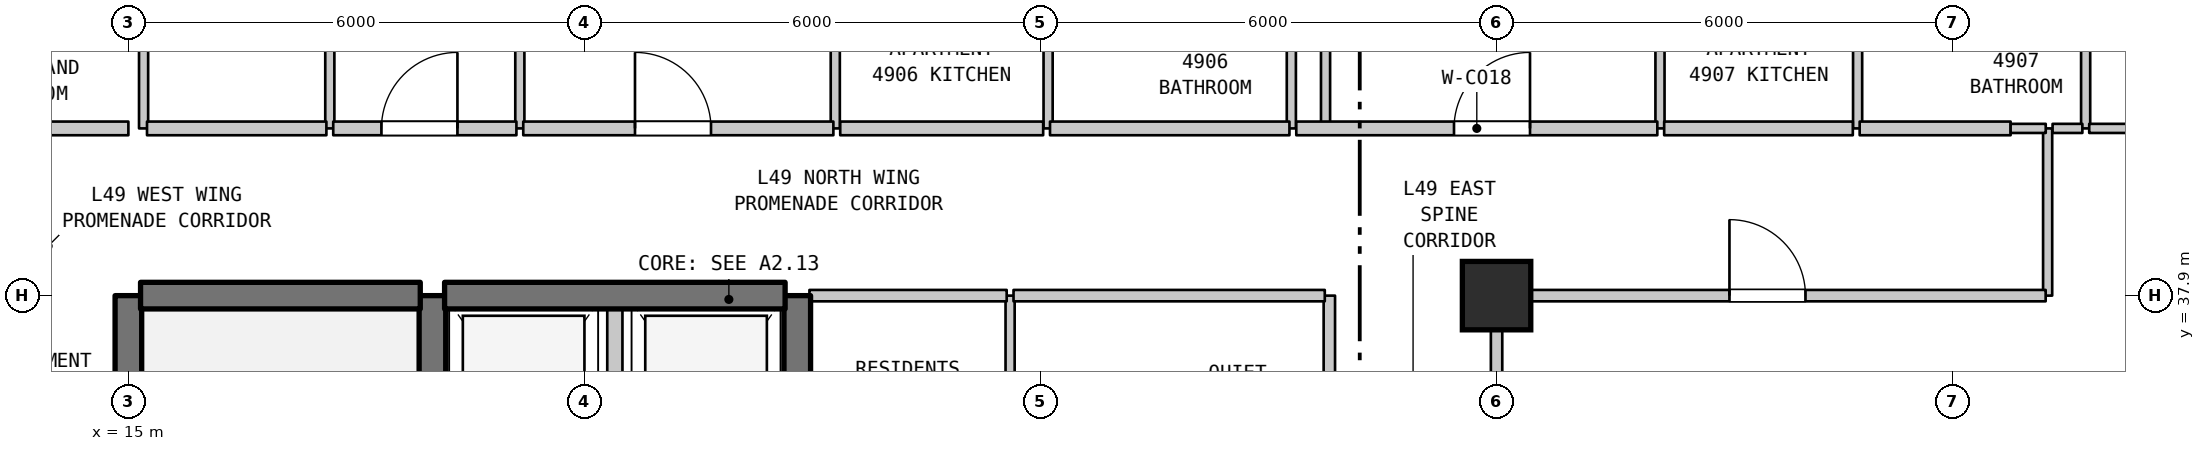
"""IFC4 building model, lengths in metres.
Left out: names, types, materials, properties, quantities, classifications, styles, units other than length and angle.
Written with IfcOpenShell. Run it as: python <this file> out.ifc"""

import sys

from ifc_helpers import new_model, si_unit, direction, frame, frame_2d, origin, origin_2d, place, context, subcontext, project, spatial, rectangle, extrude, element, fill, save


model = new_model("IFC4")
c1 = context("Model", 3, precision=1e-05, world=origin(), true_north=direction((0.0, 1.0)))
c2 = subcontext(c1, "Body", "Model", "MODEL_VIEW")
j1 = project(units=[si_unit("LENGTHUNIT", "METRE"), si_unit("PLANEANGLEUNIT", "RADIAN")], contexts=[c1])
p1 = place(None, origin())
s1 = spatial("IfcSite", under=j1, at=p1, CompositionType="ELEMENT")
p2 = place(p1, origin())
s2 = spatial("IfcBuilding", under=s1, at=p2, CompositionType="ELEMENT")
p3 = place(p2, frame((0.0, 0.0, 199.5)))
s3 = spatial("IfcBuildingStorey", under=s2, at=p3, CompositionType="ELEMENT", Elevation=199.5)
p4 = place(p3, frame((33.0, 37.9, 0.0), z_axis=(0.0, 0.0, 1.0), x_axis=(1.0, 0.0, 0.0)))
e1 = element("IfcColumn", 1, at=p4, inside=s3, PredefinedType="COLUMN", context=c2, shape_type="SweptSolid", body=[
    extrude(rectangle(XDim=0.9, YDim=0.9, at=origin_2d()), origin(), (0.0, 0.0, 1.0), 3.7),
])
p5 = place(p3, frame((15.0, 31.1, 0.0), z_axis=(0.0, 0.0, 1.0), x_axis=(0.0, 1.0, 0.0)))
e2 = element("IfcWall", 2, at=p5, inside=s3, PredefinedType="SHEAR", context=c2, shape_type="SweptSolid", body=[
    extrude(rectangle(XDim=6.8, YDim=0.35, at=frame_2d((3.4, 0.0))), origin(), (0.0, 0.0, 1.0), 3.39),
])
p6 = place(p3, frame((15.2, 40.1, 0.0), z_axis=(0.0, 0.0, 1.0), x_axis=(0.0, 1.0, 0.0)))
e3 = element("IfcWall", 3, at=p6, inside=s3, PredefinedType="PARTITIONING", context=c2, shape_type="SweptSolid", body=[
    extrude(rectangle(XDim=3.2, YDim=0.12, at=frame_2d((1.6, 0.0))), origin(), (0.0, 0.0, 1.0), 3.39),
])
p7 = place(p3, frame((17.65, 40.1, 0.0), z_axis=(0.0, 0.0, 1.0), x_axis=(0.0, 1.0, 0.0)))
e4 = element("IfcWall", 4, at=p7, inside=s3, PredefinedType="PARTITIONING", context=c2, shape_type="SweptSolid", body=[
    extrude(rectangle(XDim=3.2, YDim=0.12, at=frame_2d((1.6, 0.0))), origin(), (0.0, 0.0, 1.0), 3.39),
])
p8 = place(p7, frame((1.15, 0.0, 0.0)))
e5 = element("IfcOpeningElement", 5, at=p8, cuts=e4, PredefinedType="OPENING", context=c2, shape_type="SweptSolid", body=[
    extrude(rectangle(XDim=0.9, YDim=2.15, at=frame_2d((0.45, 1.075))), frame((0.0, 0.07, 0.0), z_axis=(0.0, -1.0, 0.0), x_axis=(1.0, 0.0, 0.0)), (0.0, 0.0, 1.0), 0.14),
])
p9 = place(p3, frame((19.0, 35.0, 0.0), z_axis=(0.0, 0.0, 1.0), x_axis=(0.0, 1.0, 0.0)))
e6 = element("IfcWall", 6, at=p9, inside=s3, PredefinedType="SHEAR", context=c2, shape_type="SweptSolid", body=[
    extrude(rectangle(XDim=2.9, YDim=0.35, at=frame_2d((1.45, 0.0))), origin(), (0.0, 0.0, 1.0), 3.39),
])
p10 = place(p3, frame((20.15, 40.1, 0.0), z_axis=(0.0, 0.0, 1.0), x_axis=(0.0, 1.0, 0.0)))
e7 = element("IfcWall", 7, at=p10, inside=s3, PredefinedType="PARTITIONING", context=c2, shape_type="SweptSolid", body=[
    extrude(rectangle(XDim=13.79, YDim=0.12, at=frame_2d((6.895, 0.0))), origin(), (0.0, 0.0, 1.0), 3.39),
])
p11 = place(p3, frame((21.4, 35.0, 0.0), z_axis=(0.0, 0.0, 1.0), x_axis=(0.0, 1.0, 0.0)))
e8 = element("IfcWall", 8, at=p11, inside=s3, PredefinedType="STANDARD", context=c2, shape_type="SweptSolid", body=[
    extrude(rectangle(XDim=2.9, YDim=0.2, at=frame_2d((1.45, 0.0))), origin(), (0.0, 0.0, 1.0), 3.39),
])
p12 = place(p3, frame((23.8, 35.0, 0.0), z_axis=(0.0, 0.0, 1.0), x_axis=(0.0, 1.0, 0.0)))
e9 = element("IfcWall", 9, at=p12, inside=s3, PredefinedType="SHEAR", context=c2, shape_type="SweptSolid", body=[
    extrude(rectangle(XDim=2.9, YDim=0.35, at=frame_2d((1.45, 0.0))), origin(), (0.0, 0.0, 1.0), 3.39),
])
p13 = place(p3, frame((24.3, 40.1, 0.0), z_axis=(0.0, 0.0, 1.0), x_axis=(0.0, 1.0, 0.0)))
e10 = element("IfcWall", 10, at=p13, inside=s3, PredefinedType="PARTITIONING", context=c2, shape_type="SweptSolid", body=[
    extrude(rectangle(XDim=2.3, YDim=0.12, at=frame_2d((1.15, 0.0))), origin(), (0.0, 0.0, 1.0), 3.39),
])
p14 = place(p3, frame((26.6, 35.0, 0.0), z_axis=(0.0, 0.0, 1.0), x_axis=(0.0, 1.0, 0.0)))
e11 = element("IfcWall", 11, at=p14, inside=s3, PredefinedType="PARTITIONING", context=c2, shape_type="SweptSolid", body=[
    extrude(rectangle(XDim=2.9, YDim=0.12, at=frame_2d((1.45, 0.0))), origin(), (0.0, 0.0, 1.0), 3.39),
])
for number, where, z_axis, x_axis in (
    (12, (27.1, 40.1, 0.0), (0.0, 0.0, 1.0), (0.0, 1.0, 0.0)),
    (13, (30.3, 40.1, 0.0), (0.0, 0.0, 1.0), (0.0, 1.0, 0.0)),
):
    element("IfcWall", number, at=place(p3, frame(where, z_axis=z_axis, x_axis=x_axis)), inside=s3, PredefinedType="PARTITIONING", context=c2, shape_type="SweptSolid", body=[
        extrude(rectangle(XDim=2.3, YDim=0.12, at=frame_2d((1.15, 0.0))), origin(), (0.0, 0.0, 1.0), 3.39),
    ])
p15 = place(p3, frame((30.75, 40.1, 0.0), z_axis=(0.0, 0.0, 1.0), x_axis=(0.0, 1.0, 0.0)))
e14 = element("IfcWall", 14, at=p15, inside=s3, PredefinedType="PARTITIONING", context=c2, shape_type="SweptSolid", body=[
    extrude(rectangle(XDim=13.79, YDim=0.12, at=frame_2d((6.895, 0.0))), origin(), (0.0, 0.0, 1.0), 3.39),
])
p16 = place(p3, frame((30.8, 35.0, 0.0), z_axis=(0.0, 0.0, 1.0), x_axis=(0.0, 1.0, 0.0)))
e15 = element("IfcWall", 15, at=p16, inside=s3, PredefinedType="STANDARD", context=c2, shape_type="SweptSolid", body=[
    extrude(rectangle(XDim=2.9, YDim=0.15, at=frame_2d((1.45, 0.0))), origin(), (0.0, 0.0, 1.0), 3.39),
])
p17 = place(p3, frame((33.0, 34.22, 0.0), z_axis=(0.0, 0.0, 1.0), x_axis=(0.0, 1.0, 0.0)))
e16 = element("IfcWall", 16, at=p17, inside=s3, PredefinedType="STANDARD", context=c2, shape_type="SweptSolid", body=[
    extrude(rectangle(XDim=3.68, YDim=0.15, at=frame_2d((1.84, 0.0))), origin(), (0.0, 0.0, 1.0), 2.89),
])
p18 = place(p17, frame((1.268, 0.0, 0.0)))
e17 = element("IfcOpeningElement", 17, at=p18, cuts=e16, PredefinedType="OPENING", context=c2, shape_type="SweptSolid", body=[
    extrude(rectangle(XDim=1.0, YDim=2.15, at=frame_2d((0.5, 1.075))), frame((0.0, 0.085, 0.0), z_axis=(0.0, -1.0, 0.0), x_axis=(1.0, 0.0, 0.0)), (0.0, 0.0, 1.0), 0.17),
])
for number, where, z_axis, x_axis in (
    (18, (35.15, 40.1, 0.0), (0.0, 0.0, 1.0), (0.0, 1.0, 0.0)),
    (19, (37.75, 40.1, 0.0), (0.0, 0.0, 1.0), (0.0, 1.0, 0.0)),
):
    element("IfcWall", number, at=place(p3, frame(where, z_axis=z_axis, x_axis=x_axis)), inside=s3, PredefinedType="PARTITIONING", context=c2, shape_type="SweptSolid", body=[
        extrude(rectangle(XDim=2.3, YDim=0.12, at=frame_2d((1.15, 0.0))), origin(), (0.0, 0.0, 1.0), 3.39),
    ])
p19 = place(p3, frame((40.25, 37.9, 0.0), z_axis=(0.0, 0.0, 1.0), x_axis=(0.0, 1.0, 0.0)))
e20 = element("IfcWall", 20, at=p19, inside=s3, PredefinedType="PARTITIONING", context=c2, shape_type="SweptSolid", body=[
    extrude(rectangle(XDim=2.2, YDim=0.12, at=frame_2d((1.1, 0.0))), origin(), (0.0, 0.0, 1.0), 3.39),
])
p20 = place(p3, frame((40.75, 40.1, 0.0), z_axis=(0.0, 0.0, 1.0), x_axis=(0.0, 1.0, 0.0)))
e21 = element("IfcWall", 21, at=p20, inside=s3, PredefinedType="PARTITIONING", context=c2, shape_type="SweptSolid", body=[
    extrude(rectangle(XDim=2.3, YDim=0.12, at=frame_2d((1.15, 0.0))), origin(), (0.0, 0.0, 1.0), 3.39),
])
p21 = place(p3, frame((15.16, 37.9, 0.0), z_axis=(0.0, 0.0, 1.0), x_axis=(1.0, 0.0, 0.0)))
e22 = element("IfcWall", 22, at=p21, inside=s3, PredefinedType="SHEAR", context=c2, shape_type="SweptSolid", body=[
    extrude(rectangle(XDim=3.68, YDim=0.35, at=frame_2d((1.84, 0.0))), origin(), (0.0, 0.0, 1.0), 3.39),
])
p22 = place(p3, frame((19.16, 37.9, 0.0), z_axis=(0.0, 0.0, 1.0), x_axis=(1.0, 0.0, 0.0)))
e23 = element("IfcWall", 23, at=p22, inside=s3, PredefinedType="SHEAR", context=c2, shape_type="SweptSolid", body=[
    extrude(rectangle(XDim=4.48, YDim=0.35, at=frame_2d((2.24, 0.0))), origin(), (0.0, 0.0, 1.0), 3.39),
])
p23 = place(p3, frame((23.96, 37.9, 0.0), z_axis=(0.0, 0.0, 1.0), x_axis=(1.0, 0.0, 0.0)))
e24 = element("IfcWall", 24, at=p23, inside=s3, PredefinedType="STANDARD", context=c2, shape_type="SweptSolid", body=[
    extrude(rectangle(XDim=2.595, YDim=0.15, at=frame_2d((1.297, 0.0))), origin(), (0.0, 0.0, 1.0), 2.89),
])
p24 = place(p3, frame((26.645, 37.9, 0.0), z_axis=(0.0, 0.0, 1.0), x_axis=(1.0, 0.0, 0.0)))
e25 = element("IfcWall", 25, at=p24, inside=s3, PredefinedType="STANDARD", context=c2, shape_type="SweptSolid", body=[
    extrude(rectangle(XDim=4.095, YDim=0.15, at=frame_2d((2.047, 0.0))), origin(), (0.0, 0.0, 1.0), 2.89),
])
p25 = place(p3, frame((33.06, 37.9, 0.0), z_axis=(0.0, 0.0, 1.0), x_axis=(1.0, 0.0, 0.0)))
e26 = element("IfcWall", 26, at=p25, inside=s3, PredefinedType="STANDARD", context=c2, shape_type="SweptSolid", body=[
    extrude(rectangle(XDim=7.164, YDim=0.15, at=frame_2d((3.582, 0.0))), origin(), (0.0, 0.0, 1.0), 3.39),
])
p26 = place(p25, frame((3.004, 0.0, 0.0)))
e27 = element("IfcOpeningElement", 27, at=p26, cuts=e26, PredefinedType="OPENING", context=c2, shape_type="SweptSolid", body=[
    extrude(rectangle(XDim=1.0, YDim=2.15, at=frame_2d((0.5, 1.075))), frame((0.0, 0.085, 0.0), z_axis=(0.0, -1.0, 0.0), x_axis=(1.0, 0.0, 0.0)), (0.0, 0.0, 1.0), 0.17),
])
p27 = place(p3, frame((12.875, 40.1, 0.0), z_axis=(0.0, 0.0, 1.0), x_axis=(1.0, 0.0, 0.0)))
e28 = element("IfcWall", 28, at=p27, inside=s3, PredefinedType="STANDARD", context=c2, shape_type="SweptSolid", body=[
    extrude(rectangle(XDim=2.125, YDim=0.18, at=frame_2d((1.062, 0.0))), origin(), (0.0, 0.0, 1.0), 3.39),
])
p28 = place(p3, frame((15.245, 40.1, 0.0), z_axis=(0.0, 0.0, 1.0), x_axis=(1.0, 0.0, 0.0)))
e29 = element("IfcWall", 29, at=p28, inside=s3, PredefinedType="STANDARD", context=c2, shape_type="SweptSolid", body=[
    extrude(rectangle(XDim=2.36, YDim=0.18, at=frame_2d((1.18, 0.0))), origin(), (0.0, 0.0, 1.0), 3.39),
])
p29 = place(p3, frame((17.695, 40.1, 0.0), z_axis=(0.0, 0.0, 1.0), x_axis=(1.0, 0.0, 0.0)))
e30 = element("IfcWall", 30, at=p29, inside=s3, PredefinedType="STANDARD", context=c2, shape_type="SweptSolid", body=[
    extrude(rectangle(XDim=2.41, YDim=0.18, at=frame_2d((1.205, 0.0))), origin(), (0.0, 0.0, 1.0), 3.39),
])
p30 = place(p29, frame((0.634, 0.0, 0.0)))
e31 = element("IfcOpeningElement", 31, at=p30, cuts=e30, PredefinedType="OPENING", context=c2, shape_type="SweptSolid", body=[
    extrude(rectangle(XDim=1.0, YDim=2.15, at=frame_2d((0.5, 1.075))), frame((0.0, 0.1, 0.0), z_axis=(0.0, -1.0, 0.0), x_axis=(1.0, 0.0, 0.0)), (0.0, 0.0, 1.0), 0.2),
])
p31 = place(p3, frame((20.195, 40.1, 0.0), z_axis=(0.0, 0.0, 1.0), x_axis=(1.0, 0.0, 0.0)))
e32 = element("IfcWall", 32, at=p31, inside=s3, PredefinedType="STANDARD", context=c2, shape_type="SweptSolid", body=[
    extrude(rectangle(XDim=4.08, YDim=0.18, at=frame_2d((2.04, 0.0))), origin(), (0.0, 0.0, 1.0), 3.39),
])
p32 = place(p31, frame((1.47, 0.0, 0.0)))
e33 = element("IfcOpeningElement", 33, at=p32, cuts=e32, PredefinedType="OPENING", context=c2, shape_type="SweptSolid", body=[
    extrude(rectangle(XDim=1.0, YDim=2.15, at=frame_2d((0.5, 1.075))), frame((0.0, 0.1, 0.0), z_axis=(0.0, -1.0, 0.0), x_axis=(1.0, 0.0, 0.0)), (0.0, 0.0, 1.0), 0.2),
])
p33 = place(p3, frame((24.365, 40.1, 0.0), z_axis=(0.0, 0.0, 1.0), x_axis=(1.0, 0.0, 0.0)))
e34 = element("IfcWall", 34, at=p33, inside=s3, PredefinedType="STANDARD", context=c2, shape_type="SweptSolid", body=[
    extrude(rectangle(XDim=2.67, YDim=0.18, at=frame_2d((1.335, 0.0))), origin(), (0.0, 0.0, 1.0), 3.39),
])
p34 = place(p3, frame((27.125, 40.1, 0.0), z_axis=(0.0, 0.0, 1.0), x_axis=(1.0, 0.0, 0.0)))
e35 = element("IfcWall", 35, at=p34, inside=s3, PredefinedType="STANDARD", context=c2, shape_type="SweptSolid", body=[
    extrude(rectangle(XDim=3.15, YDim=0.18, at=frame_2d((1.575, 0.0))), origin(), (0.0, 0.0, 1.0), 3.39),
])
p35 = place(p3, frame((30.365, 40.1, 0.0), z_axis=(0.0, 0.0, 1.0), x_axis=(1.0, 0.0, 0.0)))
e36 = element("IfcWall", 36, at=p35, inside=s3, PredefinedType="STANDARD", context=c2, shape_type="SweptSolid", body=[
    extrude(rectangle(XDim=4.75, YDim=0.18, at=frame_2d((2.375, 0.0))), origin(), (0.0, 0.0, 1.0), 3.39),
])
p36 = place(p35, frame((2.075, 0.0, 0.0)))
e37 = element("IfcOpeningElement", 37, at=p36, cuts=e36, PredefinedType="OPENING", context=c2, shape_type="SweptSolid", body=[
    extrude(rectangle(XDim=1.0, YDim=2.15, at=frame_2d((0.5, 1.075))), frame((0.0, 0.1, 0.0), z_axis=(0.0, -1.0, 0.0), x_axis=(1.0, 0.0, 0.0)), (0.0, 0.0, 1.0), 0.2),
])
p37 = place(p3, frame((35.205, 40.1, 0.0), z_axis=(0.0, 0.0, 1.0), x_axis=(1.0, 0.0, 0.0)))
e38 = element("IfcWall", 38, at=p37, inside=s3, PredefinedType="STANDARD", context=c2, shape_type="SweptSolid", body=[
    extrude(rectangle(XDim=2.482, YDim=0.18, at=frame_2d((1.241, 0.0))), origin(), (0.0, 0.0, 1.0), 3.39),
])
p38 = place(p3, frame((37.777, 40.1, 0.0), z_axis=(0.0, 0.0, 1.0), x_axis=(1.0, 0.0, 0.0)))
e39 = element("IfcWall", 39, at=p38, inside=s3, PredefinedType="STANDARD", context=c2, shape_type="SweptSolid", body=[
    extrude(rectangle(XDim=1.986, YDim=0.18, at=frame_2d((0.993, 0.0))), origin(), (0.0, 0.0, 1.0), 3.39),
])
p39 = place(p3, frame((39.763, 40.1, 0.0), z_axis=(0.0, 0.0, 1.0), x_axis=(1.0, 0.0, 0.0)))
e40 = element("IfcWall", 40, at=p39, inside=s3, PredefinedType="PARTITIONING", context=c2, shape_type="SweptSolid", body=[
    extrude(rectangle(XDim=0.462, YDim=0.12, at=frame_2d((0.231, 0.0))), origin(), (0.0, 0.0, 1.0), 3.39),
])
p40 = place(p3, frame((40.315, 40.1, 0.0), z_axis=(0.0, 0.0, 1.0), x_axis=(1.0, 0.0, 0.0)))
e41 = element("IfcWall", 41, at=p40, inside=s3, PredefinedType="PARTITIONING", context=c2, shape_type="SweptSolid", body=[
    extrude(rectangle(XDim=0.392, YDim=0.12, at=frame_2d((0.196, 0.0))), origin(), (0.0, 0.0, 1.0), 3.39),
])
p41 = place(p3, frame((40.797, 40.1, 0.0), z_axis=(0.0, 0.0, 1.0), x_axis=(1.0, 0.0, 0.0)))
e42 = element("IfcWall", 42, at=p41, inside=s3, PredefinedType="PARTITIONING", context=c2, shape_type="SweptSolid", body=[
    extrude(rectangle(XDim=1.378, YDim=0.12, at=frame_2d((0.689, 0.0))), origin(), (0.0, 0.0, 1.0), 3.39),
])
p42 = place(p26, origin())
e43 = element("IfcDoor", 43, at=p42, inside=s3, OperationType="SINGLE_SWING_LEFT", PredefinedType="DOOR", context=c2, shape_type="SweptSolid", body=[
    extrude(rectangle(XDim=1.0, YDim=2.15, at=frame_2d((0.5, 1.075))), frame((0.0, 0.025, 0.0), z_axis=(0.0, -1.0, 0.0), x_axis=(1.0, 0.0, 0.0)), (0.0, 0.0, 1.0), 0.05),
])
fill(e27, e43)
p43 = place(p30, origin())
e44 = element("IfcDoor", 44, at=p43, inside=s3, OperationType="SINGLE_SWING_RIGHT", PredefinedType="DOOR", context=c2, shape_type="SweptSolid", body=[
    extrude(rectangle(XDim=1.0, YDim=2.15, at=frame_2d((0.5, 1.075))), frame((0.0, 0.025, 0.0), z_axis=(0.0, -1.0, 0.0), x_axis=(1.0, 0.0, 0.0)), (0.0, 0.0, 1.0), 0.05),
])
fill(e31, e44)
p44 = place(p32, origin())
e45 = element("IfcDoor", 45, at=p44, inside=s3, OperationType="SINGLE_SWING_LEFT", PredefinedType="DOOR", context=c2, shape_type="SweptSolid", body=[
    extrude(rectangle(XDim=1.0, YDim=2.15, at=frame_2d((0.5, 1.075))), frame((0.0, 0.025, 0.0), z_axis=(0.0, -1.0, 0.0), x_axis=(1.0, 0.0, 0.0)), (0.0, 0.0, 1.0), 0.05),
])
fill(e33, e45)
p45 = place(p36, origin())
e46 = element("IfcDoor", 46, at=p45, inside=s3, OperationType="SINGLE_SWING_RIGHT", PredefinedType="DOOR", context=c2, shape_type="SweptSolid", body=[
    extrude(rectangle(XDim=1.0, YDim=2.15, at=frame_2d((0.5, 1.075))), frame((0.0, 0.025, 0.0), z_axis=(0.0, -1.0, 0.0), x_axis=(1.0, 0.0, 0.0)), (0.0, 0.0, 1.0), 0.05),
])
fill(e37, e46)
save(model, sys.argv[1])
